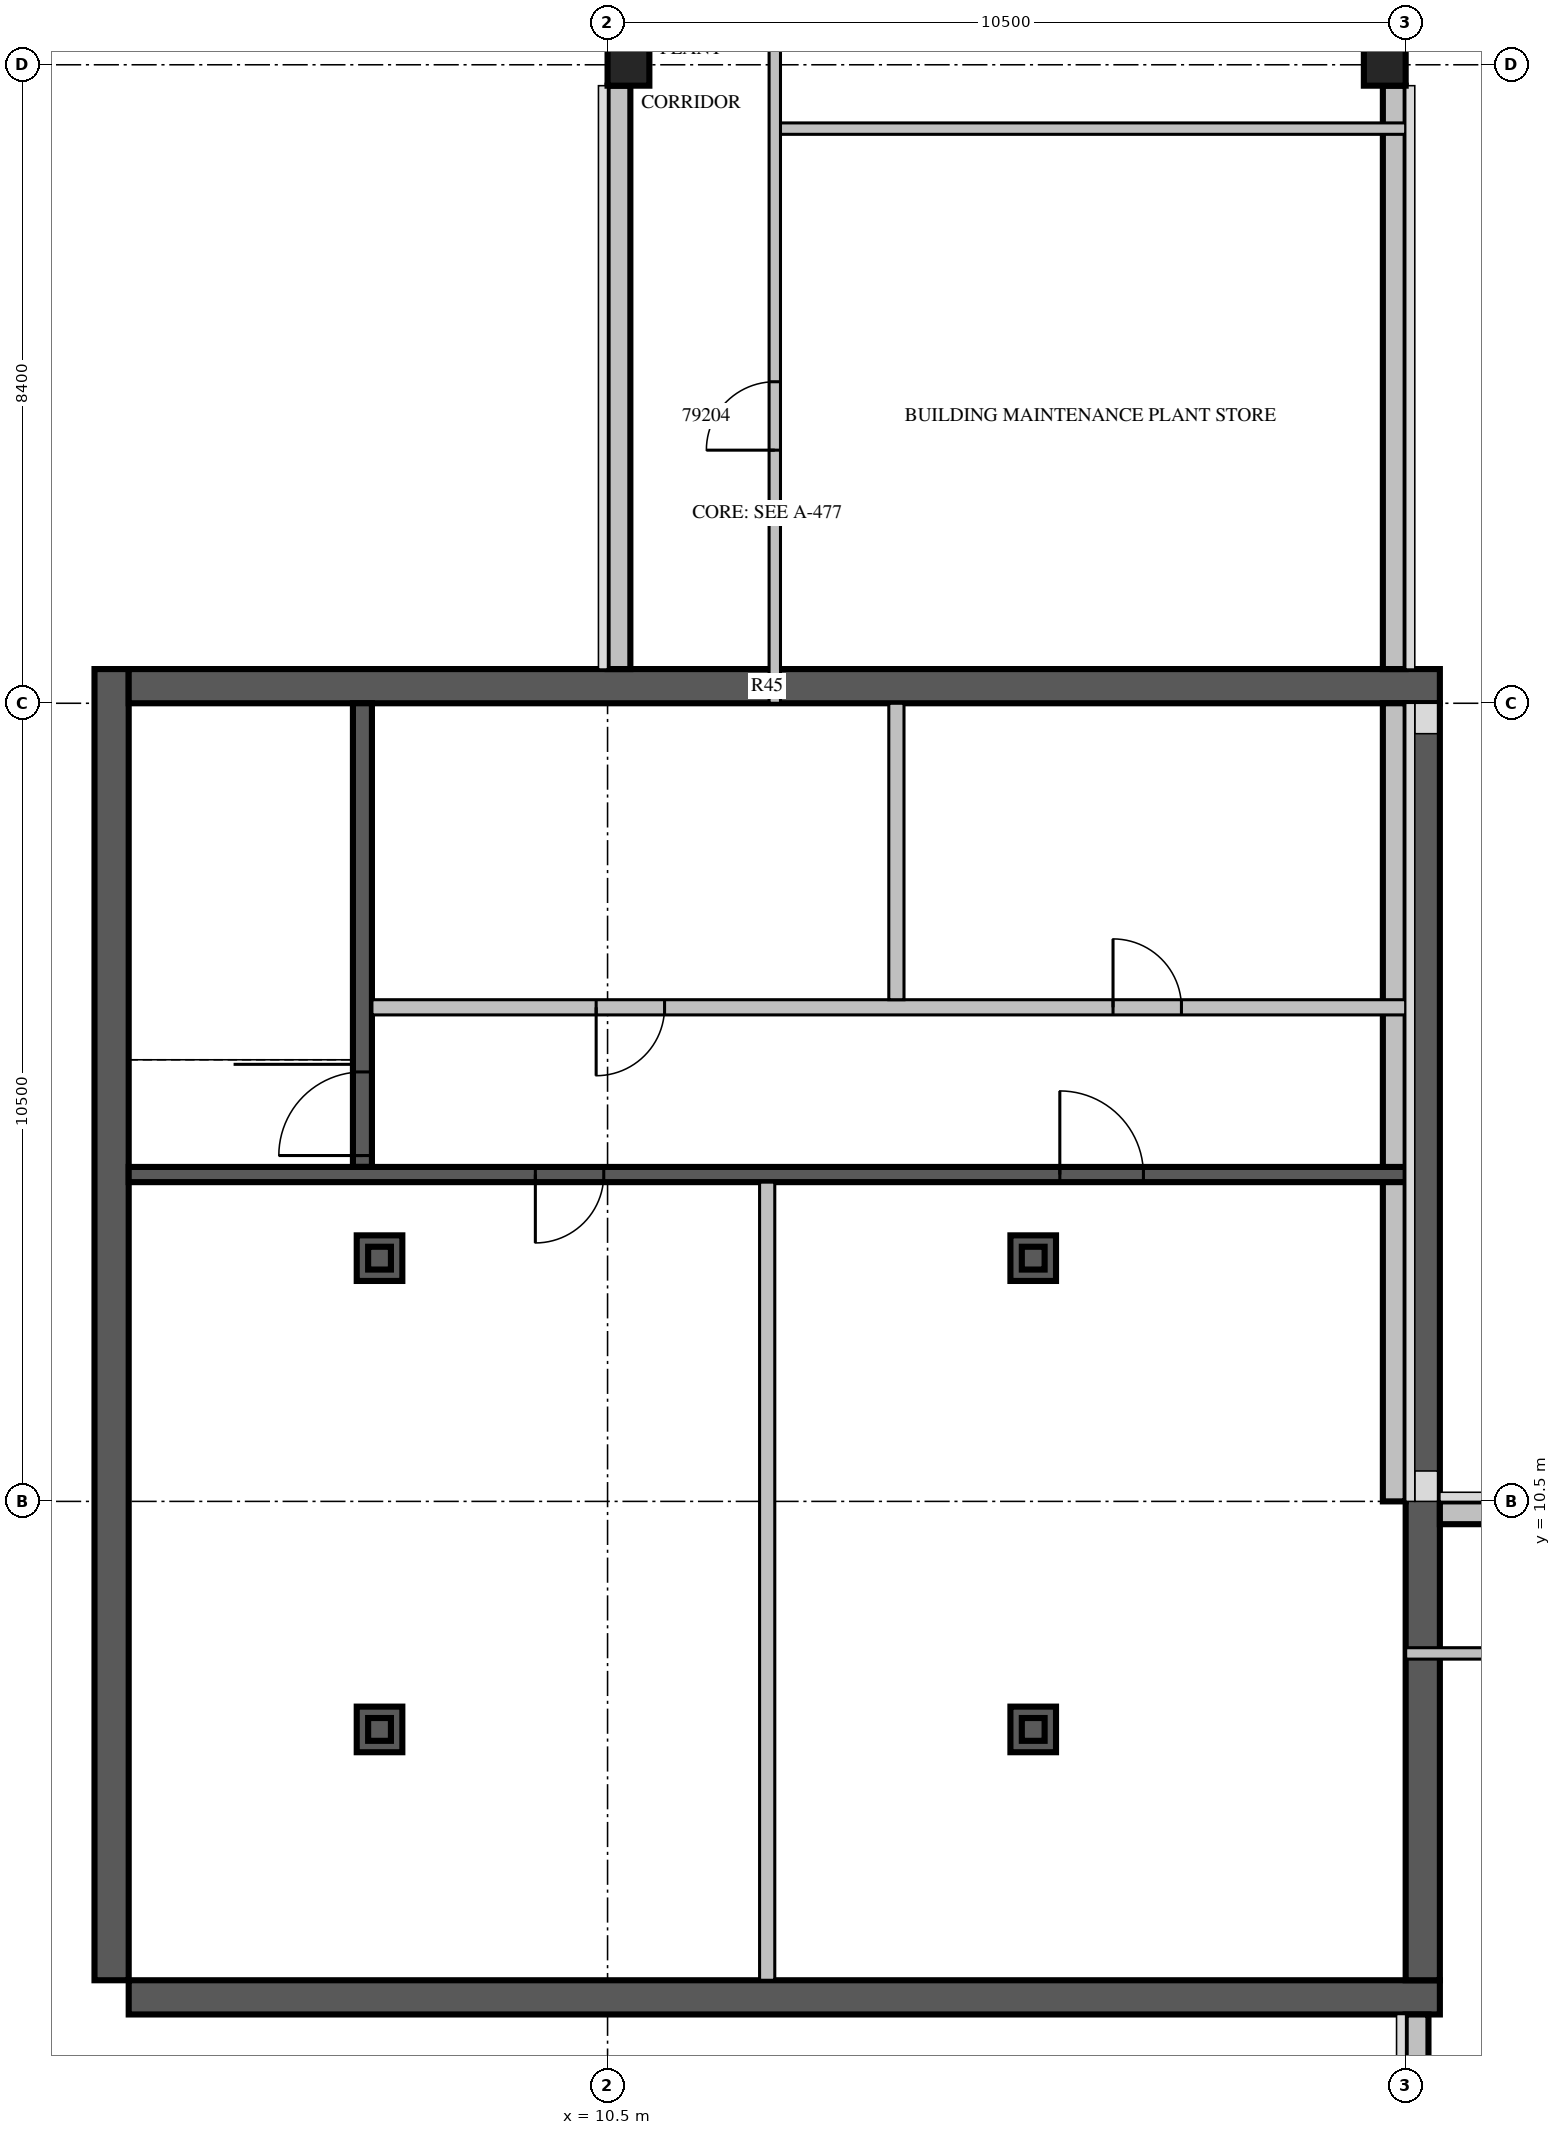
"""IFC4 building model, lengths in metres.
Left out: names, types, materials, properties, quantities, classifications, styles, units other than length and angle.
Written with IfcOpenShell. Run it as: python <this file> out.ifc"""

import sys

from ifc_helpers import new_model, si_unit, direction, frame, frame_2d, origin, origin_2d, place, context, subcontext, project, spatial, rectangle, extrude, source, transform, mapped, element, fill, save


model = new_model("IFC4")
c1 = context("Model", 3, precision=1e-05, world=origin(), true_north=direction((0.0, 1.0)))
c2 = subcontext(c1, "Body", "Model", "MODEL_VIEW")
j1 = project(units=[si_unit("LENGTHUNIT", "METRE"), si_unit("PLANEANGLEUNIT", "RADIAN")], contexts=[c1])
p1 = place(None, origin())
s1 = spatial("IfcSite", under=j1, at=p1, CompositionType="ELEMENT")
p2 = place(p1, origin())
s2 = spatial("IfcBuilding", under=s1, at=p2, CompositionType="ELEMENT")
p3 = place(p2, frame((0.0, 0.0, 372.5)))
s3 = spatial("IfcBuildingStorey", under=s2, at=p3, CompositionType="ELEMENT", Elevation=372.5)
m1 = source(origin(), c2, "Body", "SweptSolid", [
    extrude(rectangle(XDim=0.55, YDim=0.55, at=origin_2d()), origin(), (0.0, 0.0, 1.0), 4.0),
])
for number, where, z_axis, x_axis in (
    (1, (10.775, 29.4, 0.0), (0.0, 0.0, 1.0), (1.0, 0.0, 0.0)),
    (2, (20.725, 29.4, 0.0), (0.0, 0.0, 1.0), (1.0, 0.0, 0.0)),
):
    element("IfcColumn", number, at=place(p3, frame(where, z_axis=z_axis, x_axis=x_axis)), inside=s3, PredefinedType="COLUMN", context=c2, shape_type="MappedRepresentation", body=[
        mapped(m1, transform((0.0, 0.0, 0.0), scale=1.0)),
    ])
p4 = place(p3, frame((4.2, 3.975, 0.0), z_axis=(0.0, 0.0, 1.0), x_axis=(1.0, 0.0, 0.0)))
e3 = element("IfcWall", 3, at=p4, inside=s3, PredefinedType="SOLIDWALL", context=c2, shape_type="SweptSolid", body=[
    extrude(rectangle(XDim=17.25, YDim=0.45, at=frame_2d((8.625, 0.0))), origin(), (0.0, 0.0, 1.0), 3.55),
])
m2 = source(origin(), c2, "Body", "SweptSolid", [
    extrude(rectangle(XDim=17.25, YDim=0.45, at=frame_2d((8.625, 0.0))), origin(), (0.0, 0.0, 1.0), 3.55),
])
for number, where, z_axis, x_axis in (
    (4, (3.975, 4.2, 0.0), (0.0, 0.0, 1.0), (0.0, 1.0, 0.0)),
    (5, (4.2, 21.225, 0.0), (0.0, 0.0, 1.0), (1.0, 0.0, 0.0)),
):
    element("IfcWall", number, at=place(p3, frame(where, z_axis=z_axis, x_axis=x_axis)), inside=s3, PredefinedType="SOLIDWALL", context=c2, shape_type="MappedRepresentation", body=[
        mapped(m2, transform((0.0, 0.0, 0.0), scale=1.0)),
    ])
p5 = place(p3, frame((21.225, 4.2, 0.0), z_axis=(0.0, 0.0, 1.0), x_axis=(0.0, 1.0, 0.0)))
e6 = element("IfcWall", 6, at=p5, inside=s3, PredefinedType="SOLIDWALL", context=c2, shape_type="SweptSolid", body=[
    extrude(rectangle(XDim=16.8, YDim=0.45, at=frame_2d((8.4, 0.0))), origin(), (0.0, 0.0, 1.0), 3.55),
])
p6 = place(p3, frame((7.5, 7.5, 4.0), z_axis=(0.0, 0.0, 1.0), x_axis=(1.0, 0.0, 0.0)))
e7 = element("IfcWall", 7, at=p6, inside=s3, PredefinedType="SOLIDWALL", context=c2, shape_type="SweptSolid", body=[
    extrude(rectangle(XDim=0.6, YDim=0.6, at=origin_2d()), origin(), (0.0, 0.0, 1.0), 1.2),
])
p7 = place(p3, frame((7.5, 7.5, 5.2), z_axis=(0.0, 0.0, 1.0), x_axis=(1.0, 0.0, 0.0)))
e8 = element("IfcWall", 8, at=p7, inside=s3, PredefinedType="SOLIDWALL", context=c2, shape_type="SweptSolid", body=[
    extrude(rectangle(XDim=0.3, YDim=0.3, at=origin_2d()), origin(), (0.0, 0.0, 1.0), 0.9),
])
m3 = source(origin(), c2, "Body", "SweptSolid", [
    extrude(rectangle(XDim=0.6, YDim=0.6, at=origin_2d()), origin(), (0.0, 0.0, 1.0), 1.2),
])
p8 = place(p3, frame((16.1, 7.5, 4.0), z_axis=(0.0, 0.0, 1.0), x_axis=(1.0, 0.0, 0.0)))
e9 = element("IfcWall", 9, at=p8, inside=s3, PredefinedType="SOLIDWALL", context=c2, shape_type="MappedRepresentation", body=[
    mapped(m3, transform((0.0, 0.0, 0.0), scale=1.0)),
])
m4 = source(origin(), c2, "Body", "SweptSolid", [
    extrude(rectangle(XDim=0.3, YDim=0.3, at=origin_2d()), origin(), (0.0, 0.0, 1.0), 0.9),
])
p9 = place(p3, frame((16.1, 7.5, 5.2), z_axis=(0.0, 0.0, 1.0), x_axis=(1.0, 0.0, 0.0)))
e10 = element("IfcWall", 10, at=p9, inside=s3, PredefinedType="SOLIDWALL", context=c2, shape_type="MappedRepresentation", body=[
    mapped(m4, transform((0.0, 0.0, 0.0), scale=1.0)),
])
p10 = place(p3, frame((7.5, 13.7, 4.0), z_axis=(0.0, 0.0, 1.0), x_axis=(1.0, 0.0, 0.0)))
e11 = element("IfcWall", 11, at=p10, inside=s3, PredefinedType="SOLIDWALL", context=c2, shape_type="MappedRepresentation", body=[
    mapped(m3, transform((0.0, 0.0, 0.0), scale=1.0)),
])
p11 = place(p3, frame((7.5, 13.7, 5.2), z_axis=(0.0, 0.0, 1.0), x_axis=(1.0, 0.0, 0.0)))
e12 = element("IfcWall", 12, at=p11, inside=s3, PredefinedType="SOLIDWALL", context=c2, shape_type="MappedRepresentation", body=[
    mapped(m4, transform((0.0, 0.0, 0.0), scale=1.0)),
])
p12 = place(p3, frame((16.1, 13.7, 4.0), z_axis=(0.0, 0.0, 1.0), x_axis=(1.0, 0.0, 0.0)))
e13 = element("IfcWall", 13, at=p12, inside=s3, PredefinedType="SOLIDWALL", context=c2, shape_type="MappedRepresentation", body=[
    mapped(m3, transform((0.0, 0.0, 0.0), scale=1.0)),
])
p13 = place(p3, frame((16.1, 13.7, 5.2), z_axis=(0.0, 0.0, 1.0), x_axis=(1.0, 0.0, 0.0)))
e14 = element("IfcWall", 14, at=p13, inside=s3, PredefinedType="SOLIDWALL", context=c2, shape_type="MappedRepresentation", body=[
    mapped(m4, transform((0.0, 0.0, 0.0), scale=1.0)),
])
p14 = place(p3, frame((29.125, 10.35, 0.0), z_axis=(0.0, 0.0, 1.0), x_axis=(-1.0, 0.0, 0.0)))
e15 = element("IfcWall", 15, at=p14, inside=s3, PredefinedType="STANDARD", context=c2, shape_type="SweptSolid", body=[
    extrude(rectangle(XDim=7.675, YDim=0.3, at=frame_2d((3.837, 0.0))), origin(), (0.0, 0.0, 1.0), 3.55),
])
m5 = source(origin(), c2, "Body", "SweptSolid", [
    extrude(rectangle(XDim=10.5, YDim=0.3, at=frame_2d((5.25, 0.0))), origin(), (0.0, 0.0, 1.0), 3.55),
])
p15 = place(p3, frame((20.85, 10.5, 0.0), z_axis=(0.0, 0.0, 1.0), x_axis=(0.0, 1.0, 0.0)))
e16 = element("IfcWall", 16, at=p15, inside=s3, PredefinedType="STANDARD", context=c2, shape_type="MappedRepresentation", body=[
    mapped(m5, transform((0.0, 0.0, 0.0), scale=1.0)),
])
m6 = source(origin(), c2, "Body", "SweptSolid", [
    extrude(rectangle(XDim=7.675, YDim=0.3, at=frame_2d((3.837, 0.0))), origin(), (0.0, 0.0, 1.0), 3.55),
])
for number, where, z_axis, x_axis in (
    (17, (20.85, 21.45, 0.0), (0.0, 0.0, 1.0), (0.0, 1.0, 0.0)),
    (18, (10.65, 29.125, 0.0), (0.0, 0.0, 1.0), (0.0, -1.0, 0.0)),
):
    element("IfcWall", number, at=place(p3, frame(where, z_axis=z_axis, x_axis=x_axis)), inside=s3, PredefinedType="STANDARD", context=c2, shape_type="MappedRepresentation", body=[
        mapped(m6, transform((0.0, 0.0, 0.0), scale=1.0)),
    ])
p16 = place(p3, frame((21.15, 3.75, 0.0), z_axis=(0.0, 0.0, 1.0), x_axis=(0.0, -1.0, 0.0)))
e19 = element("IfcWall", 19, at=p16, inside=s3, PredefinedType="STANDARD", context=c2, shape_type="SweptSolid", body=[
    extrude(rectangle(XDim=3.2, YDim=0.3, at=frame_2d((1.6, 0.0))), origin(), (0.0, 0.0, 1.0), 3.55),
])
p17 = place(p3, frame((7.275, 14.9, 0.0), z_axis=(0.0, 0.0, 1.0), x_axis=(0.0, 1.0, 0.0)))
e20 = element("IfcWall", 20, at=p17, inside=s3, PredefinedType="SOLIDWALL", context=c2, shape_type="SweptSolid", body=[
    extrude(rectangle(XDim=6.1, YDim=0.25, at=frame_2d((3.05, 0.0))), origin(), (0.0, 0.0, 1.0), 3.55),
])
m7 = source(origin(), c2, "Body", "SweptSolid", [
    extrude(rectangle(XDim=1.1, YDim=2.1, at=frame_2d((0.55, 1.05))), frame((0.0, 0.135, 0.0), z_axis=(0.0, -1.0, 0.0), x_axis=(1.0, 0.0, 0.0)), (0.0, 0.0, 1.0), 0.27),
])
p18 = place(p17, frame((0.15, 0.0, 0.0)))
e21 = element("IfcOpeningElement", 21, at=p18, cuts=e20, PredefinedType="OPENING", context=c2, shape_type="MappedRepresentation", body=[
    mapped(m7, transform((0.0, 0.0, 0.0), scale=1.0)),
])
m8 = source(origin(), c2, "Body", "SweptSolid", [
    extrude(rectangle(XDim=16.8, YDim=0.2, at=frame_2d((8.4, 0.0))), origin(), (0.0, 0.0, 1.0), 3.55),
])
p19 = place(p3, frame((4.2, 14.8, 0.0), z_axis=(0.0, 0.0, 1.0), x_axis=(1.0, 0.0, 0.0)))
e22 = element("IfcWall", 22, at=p19, inside=s3, PredefinedType="SOLIDWALL", context=c2, shape_type="MappedRepresentation", body=[
    mapped(m8, transform((0.0, 0.0, 0.0), scale=1.0)),
])
m9 = source(origin(), c2, "Body", "SweptSolid", [
    extrude(rectangle(XDim=0.9, YDim=2.1, at=frame_2d((0.45, 1.05))), frame((0.0, 0.11, 0.0), z_axis=(0.0, -1.0, 0.0), x_axis=(1.0, 0.0, 0.0)), (0.0, 0.0, 1.0), 0.22),
])
p20 = place(p19, frame((5.35, 0.0, 0.0)))
e23 = element("IfcOpeningElement", 23, at=p20, cuts=e22, PredefinedType="OPENING", context=c2, shape_type="MappedRepresentation", body=[
    mapped(m9, transform((0.0, 0.0, 0.0), scale=1.0)),
])
m10 = source(origin(), c2, "Body", "SweptSolid", [
    extrude(rectangle(XDim=1.1, YDim=2.1, at=frame_2d((0.55, 1.05))), frame((0.0, 0.11, 0.0), z_axis=(0.0, -1.0, 0.0), x_axis=(1.0, 0.0, 0.0)), (0.0, 0.0, 1.0), 0.22),
])
p21 = place(p19, frame((12.25, 0.0, 0.0)))
e24 = element("IfcOpeningElement", 24, at=p21, cuts=e22, PredefinedType="OPENING", context=c2, shape_type="MappedRepresentation", body=[
    mapped(m10, transform((0.0, 0.0, 0.0), scale=1.0)),
])
p22 = place(p3, frame((12.6, 4.2, 0.0), z_axis=(0.0, 0.0, 1.0), x_axis=(0.0, 1.0, 0.0)))
e25 = element("IfcWall", 25, at=p22, inside=s3, PredefinedType="PARTITIONING", context=c2, shape_type="SweptSolid", body=[
    extrude(rectangle(XDim=10.5, YDim=0.2, at=frame_2d((5.25, 0.0))), origin(), (0.0, 0.0, 1.0), 3.55),
])
p23 = place(p3, frame((7.4, 17.0, 0.0), z_axis=(0.0, 0.0, 1.0), x_axis=(1.0, 0.0, 0.0)))
e26 = element("IfcWall", 26, at=p23, inside=s3, PredefinedType="PARTITIONING", context=c2, shape_type="SweptSolid", body=[
    extrude(rectangle(XDim=13.6, YDim=0.2, at=frame_2d((6.8, 0.0))), origin(), (0.0, 0.0, 1.0), 3.55),
])
p24 = place(p23, frame((2.95, 0.0, 0.0)))
e27 = element("IfcOpeningElement", 27, at=p24, cuts=e26, PredefinedType="OPENING", context=c2, shape_type="MappedRepresentation", body=[
    mapped(m9, transform((0.0, 0.0, 0.0), scale=1.0)),
])
p25 = place(p23, frame((9.75, 0.0, 0.0)))
e28 = element("IfcOpeningElement", 28, at=p25, cuts=e26, PredefinedType="OPENING", context=c2, shape_type="MappedRepresentation", body=[
    mapped(m9, transform((0.0, 0.0, 0.0), scale=1.0)),
])
p26 = place(p3, frame((14.3, 17.1, 0.0), z_axis=(0.0, 0.0, 1.0), x_axis=(0.0, 1.0, 0.0)))
e29 = element("IfcWall", 29, at=p26, inside=s3, PredefinedType="PARTITIONING", context=c2, shape_type="SweptSolid", body=[
    extrude(rectangle(XDim=3.9, YDim=0.2, at=frame_2d((1.95, 0.0))), origin(), (0.0, 0.0, 1.0), 3.55),
])
p27 = place(p3, frame((21.0, 8.5, 0.0), z_axis=(0.0, 0.0, 1.0), x_axis=(1.0, 0.0, 0.0)))
e30 = element("IfcWall", 30, at=p27, inside=s3, PredefinedType="PARTITIONING", context=c2, shape_type="SweptSolid", body=[
    extrude(rectangle(XDim=17.4, YDim=0.15, at=frame_2d((8.7, 0.0))), origin(), (0.0, 0.0, 1.0), 3.55),
])
m11 = source(origin(), c2, "Body", "SweptSolid", [
    extrude(rectangle(XDim=1.2, YDim=2.1, at=frame_2d((0.6, 1.05))), frame((0.0, 0.085, 0.0), z_axis=(0.0, -1.0, 0.0), x_axis=(1.0, 0.0, 0.0)), (0.0, 0.0, 1.0), 0.17),
])
p28 = place(p27, frame((4.16, 0.0, 0.0)))
e31 = element("IfcOpeningElement", 31, at=p28, cuts=e30, PredefinedType="OPENING", context=c2, shape_type="MappedRepresentation", body=[
    mapped(m11, transform((0.0, 0.0, 0.0), scale=1.0)),
])
p29 = place(p27, frame((12.86, 0.0, 0.0)))
e32 = element("IfcOpeningElement", 32, at=p29, cuts=e30, PredefinedType="OPENING", context=c2, shape_type="MappedRepresentation", body=[
    mapped(m11, transform((0.0, 0.0, 0.0), scale=1.0)),
])
p30 = place(p3, frame((12.7, 28.56, 0.0), z_axis=(0.0, 0.0, 1.0), x_axis=(1.0, 0.0, 0.0)))
e33 = element("IfcWall", 33, at=p30, inside=s3, PredefinedType="PARTITIONING", context=c2, shape_type="SweptSolid", body=[
    extrude(rectangle(XDim=8.3, YDim=0.15, at=frame_2d((4.15, 0.0))), origin(), (0.0, 0.0, 1.0), 3.55),
])
m12 = source(origin(), c2, "Body", "SweptSolid", [
    extrude(rectangle(XDim=17.4, YDim=0.15, at=frame_2d((8.7, 0.0))), origin(), (0.0, 0.0, 1.0), 3.55),
])
p31 = place(p3, frame((12.7, 21.0, 0.0), z_axis=(0.0, 0.0, 1.0), x_axis=(0.0, 1.0, 0.0)))
e34 = element("IfcWall", 34, at=p31, inside=s3, PredefinedType="PARTITIONING", context=c2, shape_type="MappedRepresentation", body=[
    mapped(m12, transform((0.0, 0.0, 0.0), scale=1.0)),
])
m13 = source(origin(), c2, "Body", "SweptSolid", [
    extrude(rectangle(XDim=0.9, YDim=2.1, at=frame_2d((0.45, 1.05))), frame((0.0, 0.085, 0.0), z_axis=(0.0, -1.0, 0.0), x_axis=(1.0, 0.0, 0.0)), (0.0, 0.0, 1.0), 0.17),
])
p32 = place(p31, frame((3.33, 0.0, 0.0)))
e35 = element("IfcOpeningElement", 35, at=p32, cuts=e34, PredefinedType="OPENING", context=c2, shape_type="MappedRepresentation", body=[
    mapped(m13, transform((0.0, 0.0, 0.0), scale=1.0)),
])
p33 = place(p31, frame((10.74, 0.0, 0.0)))
e36 = element("IfcOpeningElement", 36, at=p33, cuts=e34, PredefinedType="OPENING", context=c2, shape_type="MappedRepresentation", body=[
    mapped(m11, transform((0.0, 0.0, 0.0), scale=1.0)),
])
p34 = place(p31, frame((15.57, 0.0, 0.0)))
e37 = element("IfcOpeningElement", 37, at=p34, cuts=e34, PredefinedType="OPENING", context=c2, shape_type="MappedRepresentation", body=[
    mapped(m11, transform((0.0, 0.0, 0.0), scale=1.0)),
])
m14 = source(origin(), c2, "Body", "SweptSolid", [
    extrude(rectangle(XDim=1.1, YDim=2.1, at=frame_2d((0.55, 1.05))), frame((0.0, 0.025, 0.0), z_axis=(0.0, -1.0, 0.0), x_axis=(1.0, 0.0, 0.0)), (0.0, 0.0, 1.0), 0.05),
])
p35 = place(p18, origin())
e38 = element("IfcDoor", 38, at=p35, inside=s3, OperationType="SINGLE_SWING_LEFT", PredefinedType="DOOR", context=c2, shape_type="MappedRepresentation", body=[
    mapped(m14, transform((0.0, 0.0, 0.0), scale=1.0)),
])
fill(e21, e38)
m15 = source(origin(), c2, "Body", "SweptSolid", [
    extrude(rectangle(XDim=0.9, YDim=2.1, at=frame_2d((0.45, 1.05))), frame((0.0, 0.025, 0.0), z_axis=(0.0, -1.0, 0.0), x_axis=(1.0, 0.0, 0.0)), (0.0, 0.0, 1.0), 0.05),
])
p36 = place(p20, origin())
e39 = element("IfcDoor", 39, at=p36, inside=s3, OperationType="SINGLE_SWING_RIGHT", PredefinedType="DOOR", context=c2, shape_type="MappedRepresentation", body=[
    mapped(m15, transform((0.0, 0.0, 0.0), scale=1.0)),
])
fill(e23, e39)
p37 = place(p21, origin())
e40 = element("IfcDoor", 40, at=p37, inside=s3, OperationType="SINGLE_SWING_LEFT", PredefinedType="DOOR", context=c2, shape_type="MappedRepresentation", body=[
    mapped(m14, transform((0.0, 0.0, 0.0), scale=1.0)),
])
fill(e24, e40)
p38 = place(p24, origin())
e41 = element("IfcDoor", 41, at=p38, inside=s3, OperationType="SINGLE_SWING_RIGHT", PredefinedType="DOOR", context=c2, shape_type="MappedRepresentation", body=[
    mapped(m15, transform((0.0, 0.0, 0.0), scale=1.0)),
])
fill(e27, e41)
p39 = place(p25, origin())
e42 = element("IfcDoor", 42, at=p39, inside=s3, OperationType="SINGLE_SWING_LEFT", PredefinedType="DOOR", context=c2, shape_type="MappedRepresentation", body=[
    mapped(m15, transform((0.0, 0.0, 0.0), scale=1.0)),
])
fill(e28, e42)
p40 = place(p32, origin())
e43 = element("IfcDoor", 43, at=p40, inside=s3, OperationType="SINGLE_SWING_LEFT", PredefinedType="DOOR", context=c2, shape_type="MappedRepresentation", body=[
    mapped(m15, transform((0.0, 0.0, 0.0), scale=1.0)),
])
fill(e35, e43)
save(model, sys.argv[1])
